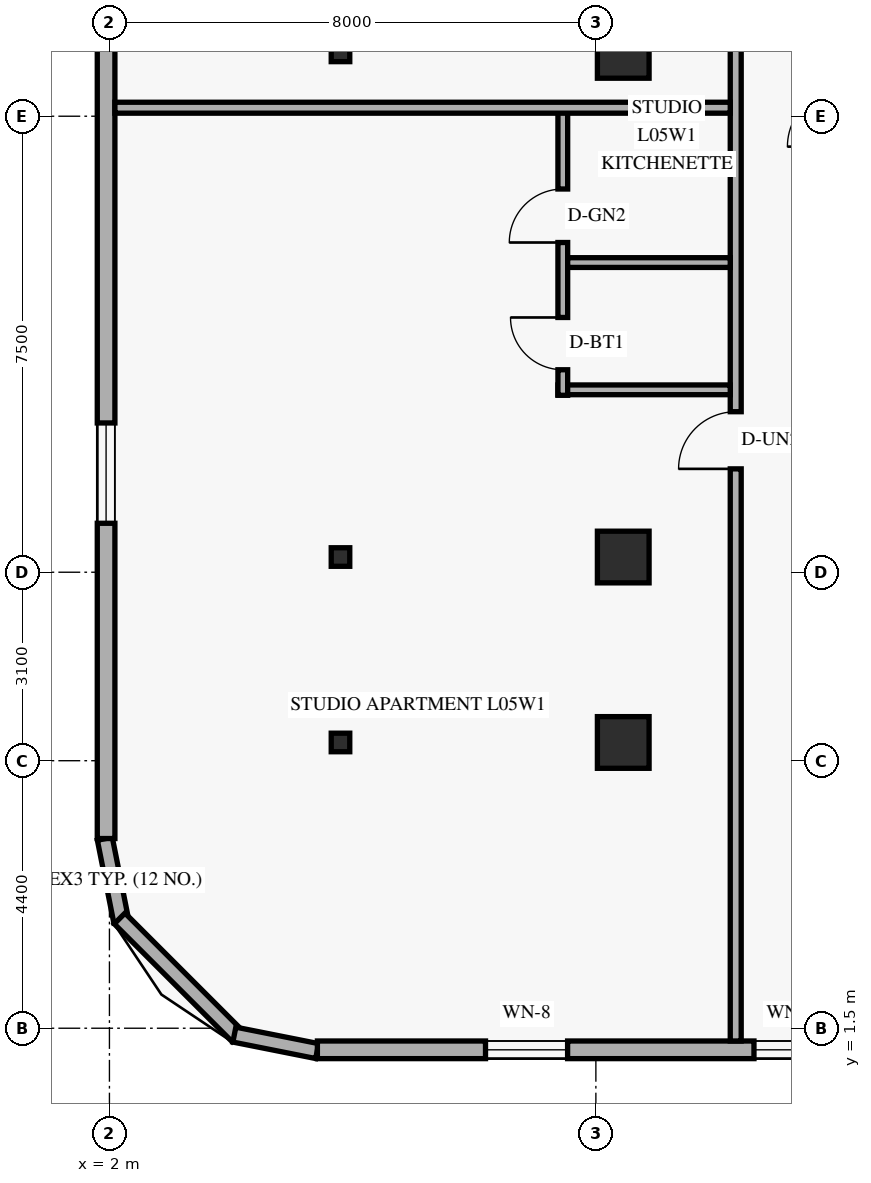
"""IFC4 building model, lengths in metres.
Left out: names, types, materials, properties, quantities, classifications, styles, units other than length and angle.
Written with IfcOpenShell. Run it as: python <this file> out.ifc"""

import sys

from ifc_helpers import new_model, si_unit, direction, frame, frame_2d, origin, origin_2d, place, context, subcontext, project, spatial, rectangle, hollow_rectangle, extrude, element, fill, save


model = new_model("IFC4")
c1 = context("Model", 3, precision=1e-05, world=origin(), true_north=direction((0.0, 1.0)))
c2 = subcontext(c1, "Body", "Model", "MODEL_VIEW")
j1 = project(units=[si_unit("LENGTHUNIT", "METRE"), si_unit("PLANEANGLEUNIT", "RADIAN")], contexts=[c1])
p1 = place(None, origin())
s1 = spatial("IfcSite", under=j1, at=p1, CompositionType="ELEMENT")
p2 = place(p1, origin())
s2 = spatial("IfcBuilding", under=s1, at=p2, CompositionType="ELEMENT")
p3 = place(p2, frame((0.0, 0.0, 24.0)))
s3 = spatial("IfcBuildingStorey", under=s2, at=p3, CompositionType="ELEMENT", Elevation=24.0)
for number, where, z_axis, x_axis in (
    (1, (5.8, 6.2, -0.3), (0.0, 0.0, 1.0), (1.0, 0.0, 0.0)),
    (2, (5.8, 9.25, -0.3), (0.0, 0.0, 1.0), (1.0, 0.0, 0.0)),
    (3, (5.8, 17.55, -0.3), (0.0, 0.0, 1.0), (1.0, 0.0, 0.0)),
):
    element("IfcColumn", number, at=place(p3, frame(where, z_axis=z_axis, x_axis=x_axis)), inside=s3, PredefinedType="COLUMN", context=c2, shape_type="SweptSolid", body=[
        extrude(hollow_rectangle(XDim=0.305, YDim=0.305, WallThickness=0.013, at=origin_2d()), origin(), (0.0, 0.0, 1.0), 3.9),
    ])
for number, where, z_axis, x_axis in (
    (4, (10.45, 6.2, 0.0), (0.0, 0.0, 1.0), (1.0, 0.0, 0.0)),
    (5, (10.45, 9.25, 0.0), (0.0, 0.0, 1.0), (1.0, 0.0, 0.0)),
    (6, (10.45, 17.55, 0.0), (0.0, 0.0, 1.0), (1.0, 0.0, 0.0)),
):
    element("IfcColumn", number, at=place(p3, frame(where, z_axis=z_axis, x_axis=x_axis)), inside=s3, PredefinedType="COLUMN", context=c2, shape_type="SweptSolid", body=[
        extrude(rectangle(XDim=0.85, YDim=0.85, at=origin_2d()), origin(), (0.0, 0.0, 1.0), 3.6),
    ])
p4 = place(p3, frame((1.924, 4.616, 0.0), z_axis=(0.0, 0.0, 1.0), x_axis=(0.19496651342, -0.980809899341, 0.0)))
e7 = element("IfcWall", 7, at=p4, inside=s3, PredefinedType="SOLIDWALL", context=c2, shape_type="SweptSolid", body=[
    extrude(rectangle(XDim=1.389, YDim=0.25, at=frame_2d((0.694, 0.0))), origin(), (0.0, 0.0, 1.0), 3.36),
])
p5 = place(p3, frame((2.168, 3.305, 0.0), z_axis=(0.0, 0.0, 1.0), x_axis=(0.707106781187, -0.707106781187, 0.0)))
e8 = element("IfcWall", 8, at=p5, inside=s3, PredefinedType="SOLIDWALL", context=c2, shape_type="SweptSolid", body=[
    extrude(rectangle(XDim=2.739, YDim=0.25, at=frame_2d((1.37, 0.0))), origin(), (0.0, 0.0, 1.0), 3.36),
])
p6 = place(p3, frame((4.054, 1.395, 0.0), z_axis=(0.0, 0.0, 1.0), x_axis=(0.980809899341, -0.19496651342, 0.0)))
e9 = element("IfcWall", 9, at=p6, inside=s3, PredefinedType="SOLIDWALL", context=c2, shape_type="SweptSolid", body=[
    extrude(rectangle(XDim=1.389, YDim=0.25, at=frame_2d((0.694, 0.0))), origin(), (0.0, 0.0, 1.0), 3.36),
])
p7 = place(p3, frame((5.42, 1.145, 0.0), z_axis=(0.0, 0.0, 1.0), x_axis=(1.0, 0.0, 0.0)))
e10 = element("IfcWall", 10, at=p7, inside=s3, PredefinedType="SOLIDWALL", context=c2, shape_type="SweptSolid", body=[
    extrude(rectangle(XDim=39.56, YDim=0.29, at=frame_2d((19.78, 0.0))), origin(), (0.0, 0.0, 1.0), 3.36),
])
p8 = place(p7, frame((2.765, 0.0, 0.85)))
e11 = element("IfcOpeningElement", 11, at=p8, cuts=e10, PredefinedType="OPENING", context=c2, shape_type="SweptSolid", body=[
    extrude(rectangle(XDim=1.35, YDim=1.55, at=frame_2d((0.675, 0.775))), frame((0.0, 0.155, 0.0), z_axis=(0.0, -1.0, 0.0), x_axis=(1.0, 0.0, 0.0)), (0.0, 0.0, 1.0), 0.31),
])
p9 = place(p7, frame((7.18, 0.0, 0.85)))
e12 = element("IfcOpeningElement", 12, at=p9, cuts=e10, PredefinedType="OPENING", context=c2, shape_type="SweptSolid", body=[
    extrude(rectangle(XDim=1.2, YDim=1.5, at=frame_2d((0.6, 0.75))), frame((0.0, 0.155, 0.0), z_axis=(0.0, -1.0, 0.0), x_axis=(1.0, 0.0, 0.0)), (0.0, 0.0, 1.0), 0.31),
])
p10 = place(p7, frame((11.17, 0.0, 0.85)))
e13 = element("IfcOpeningElement", 13, at=p10, cuts=e10, PredefinedType="OPENING", context=c2, shape_type="SweptSolid", body=[
    extrude(rectangle(XDim=1.35, YDim=1.55, at=frame_2d((0.675, 0.775))), frame((0.0, 0.155, 0.0), z_axis=(0.0, -1.0, 0.0), x_axis=(1.0, 0.0, 0.0)), (0.0, 0.0, 1.0), 0.31),
])
p11 = place(p7, frame((16.406, 0.0, 0.85)))
e14 = element("IfcOpeningElement", 14, at=p11, cuts=e10, PredefinedType="OPENING", context=c2, shape_type="SweptSolid", body=[
    extrude(rectangle(XDim=1.35, YDim=1.55, at=frame_2d((0.675, 0.775))), frame((0.0, 0.155, 0.0), z_axis=(0.0, -1.0, 0.0), x_axis=(1.0, 0.0, 0.0)), (0.0, 0.0, 1.0), 0.31),
])
p12 = place(p7, frame((21.83, 0.0, 0.85)))
e15 = element("IfcOpeningElement", 15, at=p12, cuts=e10, PredefinedType="OPENING", context=c2, shape_type="SweptSolid", body=[
    extrude(rectangle(XDim=1.35, YDim=1.55, at=frame_2d((0.675, 0.775))), frame((0.0, 0.155, 0.0), z_axis=(0.0, -1.0, 0.0), x_axis=(1.0, 0.0, 0.0)), (0.0, 0.0, 1.0), 0.31),
])
p13 = place(p7, frame((27.255, 0.0, 0.85)))
e16 = element("IfcOpeningElement", 16, at=p13, cuts=e10, PredefinedType="OPENING", context=c2, shape_type="SweptSolid", body=[
    extrude(rectangle(XDim=1.35, YDim=1.55, at=frame_2d((0.675, 0.775))), frame((0.0, 0.155, 0.0), z_axis=(0.0, -1.0, 0.0), x_axis=(1.0, 0.0, 0.0)), (0.0, 0.0, 1.0), 0.31),
])
p14 = place(p7, frame((30.39, 0.0, 0.85)))
e17 = element("IfcOpeningElement", 17, at=p14, cuts=e10, PredefinedType="OPENING", context=c2, shape_type="SweptSolid", body=[
    extrude(rectangle(XDim=1.35, YDim=1.55, at=frame_2d((0.675, 0.775))), frame((0.0, 0.155, 0.0), z_axis=(0.0, -1.0, 0.0), x_axis=(1.0, 0.0, 0.0)), (0.0, 0.0, 1.0), 0.31),
])
p15 = place(p7, frame((35.17, 0.0, 0.85)))
e18 = element("IfcOpeningElement", 18, at=p15, cuts=e10, PredefinedType="OPENING", context=c2, shape_type="SweptSolid", body=[
    extrude(rectangle(XDim=1.35, YDim=1.55, at=frame_2d((0.675, 0.775))), frame((0.0, 0.155, 0.0), z_axis=(0.0, -1.0, 0.0), x_axis=(1.0, 0.0, 0.0)), (0.0, 0.0, 1.0), 0.31),
])
p16 = place(p3, frame((1.945, 43.38, 0.0), z_axis=(0.0, 0.0, 1.0), x_axis=(0.0, -1.0, 0.0)))
e19 = element("IfcWall", 19, at=p16, inside=s3, PredefinedType="SOLIDWALL", context=c2, shape_type="SweptSolid", body=[
    extrude(rectangle(XDim=38.76, YDim=0.29, at=frame_2d((19.38, 0.0))), origin(), (0.0, 0.0, 1.0), 3.36),
])
p17 = place(p16, frame((31.925, 0.0, 0.85)))
e20 = element("IfcOpeningElement", 20, at=p17, cuts=e19, PredefinedType="OPENING", context=c2, shape_type="SweptSolid", body=[
    extrude(rectangle(XDim=1.65, YDim=1.6, at=frame_2d((0.825, 0.8))), frame((0.0, 0.155, 0.0), z_axis=(0.0, -1.0, 0.0), x_axis=(1.0, 0.0, 0.0)), (0.0, 0.0, 1.0), 0.31),
])
p18 = place(p16, frame((23.913, 0.0, 0.85)))
e21 = element("IfcOpeningElement", 21, at=p18, cuts=e19, PredefinedType="OPENING", context=c2, shape_type="SweptSolid", body=[
    extrude(rectangle(XDim=1.65, YDim=1.6, at=frame_2d((0.825, 0.8))), frame((0.0, 0.155, 0.0), z_axis=(0.0, -1.0, 0.0), x_axis=(1.0, 0.0, 0.0)), (0.0, 0.0, 1.0), 0.31),
])
p19 = place(p16, frame((18.088, 0.0, 0.85)))
e22 = element("IfcOpeningElement", 22, at=p19, cuts=e19, PredefinedType="OPENING", context=c2, shape_type="SweptSolid", body=[
    extrude(rectangle(XDim=1.65, YDim=1.6, at=frame_2d((0.825, 0.8))), frame((0.0, 0.155, 0.0), z_axis=(0.0, -1.0, 0.0), x_axis=(1.0, 0.0, 0.0)), (0.0, 0.0, 1.0), 0.31),
])
p20 = place(p16, frame((12.27, 0.0, 0.85)))
e23 = element("IfcOpeningElement", 23, at=p20, cuts=e19, PredefinedType="OPENING", context=c2, shape_type="SweptSolid", body=[
    extrude(rectangle(XDim=1.65, YDim=1.6, at=frame_2d((0.825, 0.8))), frame((0.0, 0.155, 0.0), z_axis=(0.0, -1.0, 0.0), x_axis=(1.0, 0.0, 0.0)), (0.0, 0.0, 1.0), 0.31),
])
p21 = place(p16, frame((8.64, 0.0, 0.85)))
e24 = element("IfcOpeningElement", 24, at=p21, cuts=e19, PredefinedType="OPENING", context=c2, shape_type="SweptSolid", body=[
    extrude(rectangle(XDim=1.65, YDim=1.6, at=frame_2d((0.825, 0.8))), frame((0.0, 0.155, 0.0), z_axis=(0.0, -1.0, 0.0), x_axis=(1.0, 0.0, 0.0)), (0.0, 0.0, 1.0), 0.31),
])
p22 = place(p16, frame((3.09, 0.0, 0.85)))
e25 = element("IfcOpeningElement", 25, at=p22, cuts=e19, PredefinedType="OPENING", context=c2, shape_type="SweptSolid", body=[
    extrude(rectangle(XDim=1.65, YDim=1.6, at=frame_2d((0.825, 0.8))), frame((0.0, 0.155, 0.0), z_axis=(0.0, -1.0, 0.0), x_axis=(1.0, 0.0, 0.0)), (0.0, 0.0, 1.0), 0.31),
])
p23 = place(p3, frame((12.3, 1.29, 0.0), z_axis=(0.0, 0.0, 1.0), x_axis=(0.0, 1.0, 0.0)))
e26 = element("IfcWall", 26, at=p23, inside=s3, PredefinedType="STANDARD", context=c2, shape_type="SweptSolid", body=[
    extrude(rectangle(XDim=45.42, YDim=0.18, at=frame_2d((22.71, 0.0))), origin(), (0.0, 0.0, 1.0), 2.649),
])
p24 = place(p23, frame((9.41, 0.0, 0.0)))
e27 = element("IfcOpeningElement", 27, at=p24, cuts=e26, PredefinedType="OPENING", context=c2, shape_type="SweptSolid", body=[
    extrude(rectangle(XDim=0.94, YDim=2.15, at=frame_2d((0.47, 1.075))), frame((0.0, 0.1, 0.0), z_axis=(0.0, -1.0, 0.0), x_axis=(1.0, 0.0, 0.0)), (0.0, 0.0, 1.0), 0.2),
])
p25 = place(p23, frame((21.05, 0.0, 0.0)))
e28 = element("IfcOpeningElement", 28, at=p25, cuts=e26, PredefinedType="OPENING", context=c2, shape_type="SweptSolid", body=[
    extrude(rectangle(XDim=0.94, YDim=2.15, at=frame_2d((0.47, 1.075))), frame((0.0, 0.1, 0.0), z_axis=(0.0, -1.0, 0.0), x_axis=(1.0, 0.0, 0.0)), (0.0, 0.0, 1.0), 0.2),
])
p26 = place(p23, frame((36.491, 0.0, 0.0)))
e29 = element("IfcOpeningElement", 29, at=p26, cuts=e26, PredefinedType="OPENING", context=c2, shape_type="SweptSolid", body=[
    extrude(rectangle(XDim=0.94, YDim=2.15, at=frame_2d((0.47, 1.075))), frame((0.0, 0.1, 0.0), z_axis=(0.0, -1.0, 0.0), x_axis=(1.0, 0.0, 0.0)), (0.0, 0.0, 1.0), 0.2),
])
p27 = place(p3, frame((9.376, 12.0, 0.0), z_axis=(0.0, 0.0, 1.0), x_axis=(1.0, 0.0, 0.0)))
e30 = element("IfcWall", 30, at=p27, inside=s3, PredefinedType="PLUMBINGWALL", context=c2, shape_type="SweptSolid", body=[
    extrude(rectangle(XDim=2.834, YDim=0.16, at=frame_2d((1.417, 0.0))), origin(), (0.0, 0.0, 1.0), 2.649),
])
p28 = place(p3, frame((9.456, 11.91, 0.0), z_axis=(0.0, 0.0, 1.0), x_axis=(0.0, 1.0, 0.0)))
e31 = element("IfcWall", 31, at=p28, inside=s3, PredefinedType="PLUMBINGWALL", context=c2, shape_type="SweptSolid", body=[
    extrude(rectangle(XDim=4.73, YDim=0.16, at=frame_2d((2.365, 0.0))), origin(), (0.0, 0.0, 1.0), 2.932),
])
p29 = place(p28, frame((0.42, 0.0, 0.0)))
e32 = element("IfcOpeningElement", 32, at=p29, cuts=e31, PredefinedType="OPENING", context=c2, shape_type="SweptSolid", body=[
    extrude(rectangle(XDim=0.86, YDim=2.12, at=frame_2d((0.43, 1.06))), frame((0.0, 0.09, 0.0), z_axis=(0.0, -1.0, 0.0), x_axis=(1.0, 0.0, 0.0)), (0.0, 0.0, 1.0), 0.18),
])
p30 = place(p28, frame((2.513, 0.0, 0.0)))
e33 = element("IfcOpeningElement", 33, at=p30, cuts=e31, PredefinedType="OPENING", context=c2, shape_type="SweptSolid", body=[
    extrude(rectangle(XDim=0.88, YDim=2.12, at=frame_2d((0.44, 1.06))), frame((0.0, 0.09, 0.0), z_axis=(0.0, -1.0, 0.0), x_axis=(1.0, 0.0, 0.0)), (0.0, 0.0, 1.0), 0.18),
])
p31 = place(p3, frame((9.536, 14.093, 0.0), z_axis=(0.0, 0.0, 1.0), x_axis=(1.0, 0.0, 0.0)))
e34 = element("IfcWall", 34, at=p31, inside=s3, PredefinedType="PLUMBINGWALL", context=c2, shape_type="SweptSolid", body=[
    extrude(rectangle(XDim=2.674, YDim=0.16, at=frame_2d((1.337, 0.0))), origin(), (0.0, 0.0, 1.0), 2.649),
])
p32 = place(p3, frame((2.09, 16.64, 0.0), z_axis=(0.0, 0.0, 1.0), x_axis=(1.0, 0.0, 0.0)))
e35 = element("IfcWall", 35, at=p32, inside=s3, PredefinedType="PARTITIONING", context=c2, shape_type="SweptSolid", body=[
    extrude(rectangle(XDim=10.12, YDim=0.18, at=frame_2d((5.06, 0.0))), origin(), (0.0, 0.0, 1.0), 2.649),
])
p33 = place(p8, origin())
e36 = element("IfcWindow", 36, at=p33, inside=s3, PartitioningType="SINGLE_PANEL", PredefinedType="WINDOW", context=c2, shape_type="SweptSolid", body=[
    extrude(rectangle(XDim=1.35, YDim=1.55, at=frame_2d((0.675, 0.775))), frame((0.0, 0.03, 0.0), z_axis=(0.0, -1.0, 0.0), x_axis=(1.0, 0.0, 0.0)), (0.0, 0.0, 1.0), 0.06),
])
fill(e11, e36)
p34 = place(p9, origin())
e37 = element("IfcWindow", 37, at=p34, inside=s3, PartitioningType="SINGLE_PANEL", PredefinedType="WINDOW", context=c2, shape_type="SweptSolid", body=[
    extrude(rectangle(XDim=1.2, YDim=1.5, at=frame_2d((0.6, 0.75))), frame((0.0, 0.03, 0.0), z_axis=(0.0, -1.0, 0.0), x_axis=(1.0, 0.0, 0.0)), (0.0, 0.0, 1.0), 0.06),
])
fill(e12, e37)
p35 = place(p17, origin())
e38 = element("IfcWindow", 38, at=p35, inside=s3, PartitioningType="SINGLE_PANEL", PredefinedType="WINDOW", context=c2, shape_type="SweptSolid", body=[
    extrude(rectangle(XDim=1.65, YDim=1.6, at=frame_2d((0.825, 0.8))), frame((0.0, 0.03, 0.0), z_axis=(0.0, -1.0, 0.0), x_axis=(1.0, 0.0, 0.0)), (0.0, 0.0, 1.0), 0.06),
])
fill(e20, e38)
p36 = place(p24, origin())
e39 = element("IfcDoor", 39, at=p36, inside=s3, OperationType="SINGLE_SWING_LEFT", PredefinedType="DOOR", context=c2, shape_type="SweptSolid", body=[
    extrude(rectangle(XDim=0.94, YDim=2.15, at=frame_2d((0.47, 1.075))), frame((0.0, 0.025, 0.0), z_axis=(0.0, -1.0, 0.0), x_axis=(1.0, 0.0, 0.0)), (0.0, 0.0, 1.0), 0.05),
])
fill(e27, e39)
p37 = place(p29, origin())
e40 = element("IfcDoor", 40, at=p37, inside=s3, OperationType="SINGLE_SWING_RIGHT", PredefinedType="DOOR", context=c2, shape_type="SweptSolid", body=[
    extrude(rectangle(XDim=0.86, YDim=2.12, at=frame_2d((0.43, 1.06))), frame((0.0, 0.025, 0.0), z_axis=(0.0, -1.0, 0.0), x_axis=(1.0, 0.0, 0.0)), (0.0, 0.0, 1.0), 0.05),
])
fill(e32, e40)
p38 = place(p30, origin())
e41 = element("IfcDoor", 41, at=p38, inside=s3, OperationType="SINGLE_SWING_LEFT", PredefinedType="DOOR", context=c2, shape_type="SweptSolid", body=[
    extrude(rectangle(XDim=0.88, YDim=2.12, at=frame_2d((0.44, 1.06))), frame((0.0, 0.025, 0.0), z_axis=(0.0, -1.0, 0.0), x_axis=(1.0, 0.0, 0.0)), (0.0, 0.0, 1.0), 0.05),
])
fill(e33, e41)
save(model, sys.argv[1])
